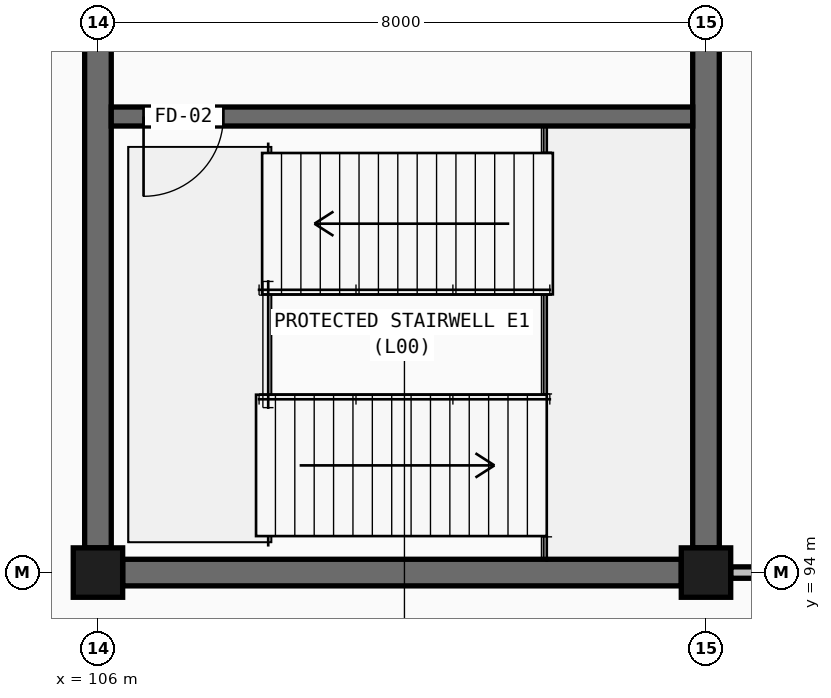
"""IFC4 building model, lengths in metres.
Left out: names, types, materials, properties, quantities, classifications, styles, units other than length and angle.
Written with IfcOpenShell. Run it as: python <this file> out.ifc"""

import sys

from ifc_helpers import new_model, si_unit, direction, frame, frame_2d, origin, origin_2d, place, context, subcontext, project, spatial, rectangle, circle, extrude, element, fill, save


model = new_model("IFC4")
c1 = context("Model", 3, precision=1e-05, world=origin(), true_north=direction((0.0, 1.0)))
c2 = subcontext(c1, "Body", "Model", "MODEL_VIEW")
j1 = project(units=[si_unit("LENGTHUNIT", "METRE"), si_unit("PLANEANGLEUNIT", "RADIAN")], contexts=[c1])
p1 = place(None, origin())
s1 = spatial("IfcSite", under=j1, at=p1, CompositionType="ELEMENT")
p2 = place(p1, origin())
s2 = spatial("IfcBuilding", under=s1, at=p2, CompositionType="ELEMENT")
p3 = place(p2, origin())
s3 = spatial("IfcBuildingStorey", under=s2, at=p3, CompositionType="ELEMENT", Elevation=0.0)
for number, where, z_axis, x_axis in (
    (1, (106.0, 94.0, 0.0), (0.0, 0.0, 1.0), (1.0, 0.0, 0.0)),
    (2, (114.0, 94.0, 0.0), (0.0, 0.0, 1.0), (1.0, 0.0, 0.0)),
):
    element("IfcColumn", number, at=place(p3, frame(where, z_axis=z_axis, x_axis=x_axis)), inside=s3, PredefinedType="COLUMN", context=c2, shape_type="SweptSolid", body=[
        extrude(circle(Radius=0.325, at=origin_2d()), origin(), (0.0, 0.0, 1.0), 5.4),
    ])
for number, where, z_axis, x_axis in (
    (3, (106.325, 94.0, 0.0), (0.0, 0.0, 1.0), (1.0, 0.0, 0.0)),
    (4, (106.0, 94.325, 0.0), (0.0, 0.0, 1.0), (0.0, 1.0, 0.0)),
    (5, (114.0, 94.325, 0.0), (0.0, 0.0, 1.0), (0.0, 1.0, 0.0)),
):
    element("IfcWall", number, at=place(p3, frame(where, z_axis=z_axis, x_axis=x_axis)), inside=s3, PredefinedType="SHEAR", context=c2, shape_type="SweptSolid", body=[
        extrude(rectangle(XDim=7.35, YDim=0.35, at=frame_2d((3.675, 0.0))), origin(), (0.0, 0.0, 1.0), 5.18),
    ])
p4 = place(p3, frame((106.175, 100.0, 0.0), z_axis=(0.0, 0.0, 1.0), x_axis=(1.0, 0.0, 0.0)))
e6 = element("IfcWall", 6, at=p4, inside=s3, PredefinedType="SOLIDWALL", context=c2, shape_type="SweptSolid", body=[
    extrude(rectangle(XDim=7.65, YDim=0.25, at=frame_2d((3.825, 0.0))), origin(), (0.0, 0.0, 1.0), 5.18),
])
p5 = place(p4, frame((0.425, 0.0, 0.0)))
e7 = element("IfcOpeningElement", 7, at=p5, cuts=e6, PredefinedType="OPENING", context=c2, shape_type="SweptSolid", body=[
    extrude(rectangle(XDim=1.05, YDim=2.2, at=frame_2d((0.525, 1.1))), frame((0.0, 0.135, 0.0), z_axis=(0.0, -1.0, 0.0), x_axis=(1.0, 0.0, 0.0)), (0.0, 0.0, 1.0), 0.27),
])
p6 = place(p3, frame((114.325, 94.0, 0.0), z_axis=(0.0, 0.0, 1.0), x_axis=(1.0, 0.0, 0.0)))
e8 = element("IfcWall", 8, at=p6, inside=s3, PredefinedType="PARTITIONING", context=c2, shape_type="SweptSolid", body=[
    extrude(rectangle(XDim=7.35, YDim=0.15, at=frame_2d((3.675, 0.0))), origin(), (0.0, 0.0, 1.0), 4.39),
])
p7 = place(p6, frame((2.57, 0.0, 0.0)))
e9 = element("IfcOpeningElement", 9, at=p7, cuts=e8, PredefinedType="OPENING", context=c2, shape_type="SweptSolid", body=[
    extrude(rectangle(XDim=1.5, YDim=2.2, at=frame_2d((0.75, 1.1))), frame((0.0, 0.085, 0.0), z_axis=(0.0, -1.0, 0.0), x_axis=(1.0, 0.0, 0.0)), (0.0, 0.0, 1.0), 0.17),
])
p8 = place(p5, frame((1.05, 0.0, 0.0), z_axis=(0.0, 0.0, 1.0), x_axis=(-1.0, 0.0, 0.0)))
e10 = element("IfcDoor", 10, at=p8, inside=s3, OperationType="SINGLE_SWING_LEFT", PredefinedType="DOOR", context=c2, shape_type="SweptSolid", body=[
    extrude(rectangle(XDim=1.05, YDim=2.2, at=frame_2d((0.525, 1.1))), frame((0.0, 0.025, 0.0), z_axis=(0.0, -1.0, 0.0), x_axis=(1.0, 0.0, 0.0)), (0.0, 0.0, 1.0), 0.05),
])
fill(e7, e10)
save(model, sys.argv[1])
